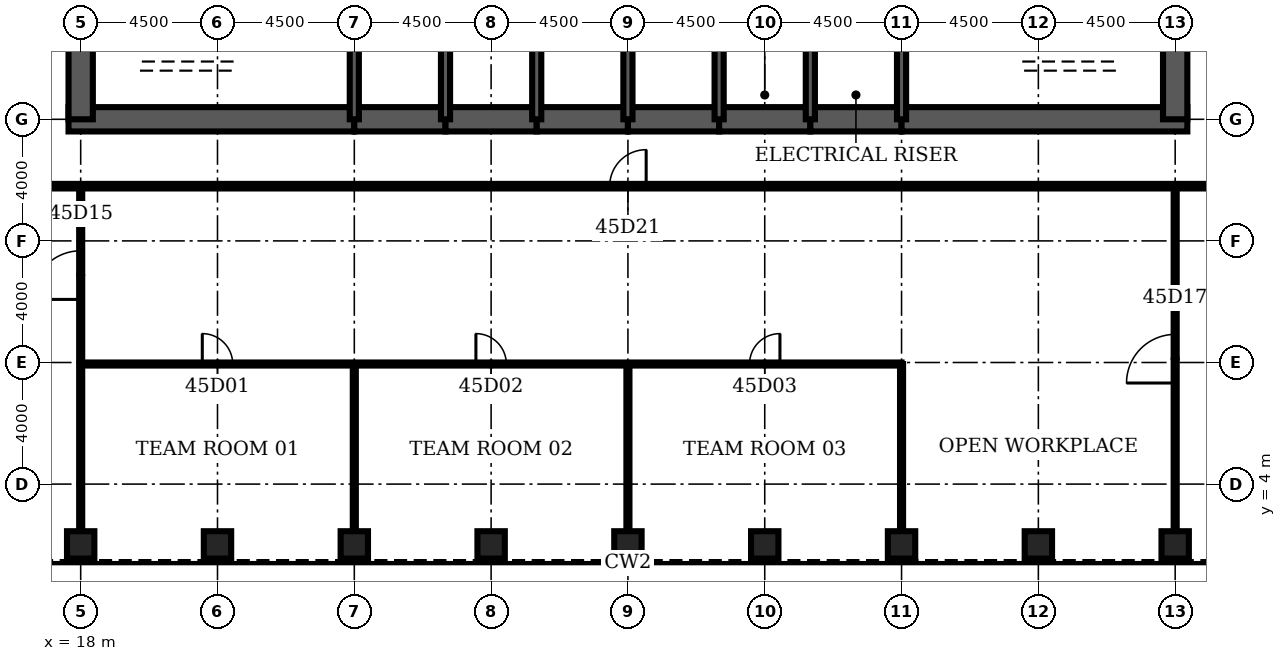
"""IFC4 building model, lengths in metres.
Left out: names, types, materials, properties, quantities, classifications, styles, units other than length and angle.
Written with IfcOpenShell. Run it as: python <this file> out.ifc"""

import sys

from ifc_helpers import new_model, si_unit, direction, frame, frame_2d, origin, origin_2d, place, context, subcontext, project, spatial, rectangle, hollow_rectangle, extrude, element, fill, save


model = new_model("IFC4")
c1 = context("Model", 3, precision=1e-05, world=origin(), true_north=direction((0.0, 1.0)))
c2 = subcontext(c1, "Body", "Model", "MODEL_VIEW")
j1 = project(units=[si_unit("LENGTHUNIT", "METRE"), si_unit("PLANEANGLEUNIT", "RADIAN")], contexts=[c1])
p1 = place(None, origin())
s1 = spatial("IfcSite", under=j1, at=p1, CompositionType="ELEMENT")
p2 = place(p1, origin())
s2 = spatial("IfcBuilding", under=s1, at=p2, CompositionType="ELEMENT")
p3 = place(p2, frame((0.0, 0.0, 202.6)))
s3 = spatial("IfcBuildingStorey", under=s2, at=p3, CompositionType="ELEMENT", Elevation=202.6)
for number, where, z_axis, x_axis in (
    (1, (18.0, 2.0, 0.0), (0.0, 0.0, 1.0), (0.0, 1.0, 0.0)),
    (2, (22.5, 2.0, 0.0), (0.0, 0.0, 1.0), (0.0, 1.0, 0.0)),
    (3, (27.0, 2.0, 0.0), (0.0, 0.0, 1.0), (0.0, 1.0, 0.0)),
    (4, (31.5, 2.0, 0.0), (0.0, 0.0, 1.0), (0.0, 1.0, 0.0)),
    (5, (36.0, 2.0, 0.0), (0.0, 0.0, 1.0), (0.0, 1.0, 0.0)),
    (6, (40.5, 2.0, 0.0), (0.0, 0.0, 1.0), (0.0, 1.0, 0.0)),
    (7, (45.0, 2.0, 0.0), (0.0, 0.0, 1.0), (0.0, 1.0, 0.0)),
    (8, (49.5, 2.0, 0.0), (0.0, 0.0, 1.0), (0.0, 1.0, 0.0)),
    (9, (54.0, 2.0, 0.0), (0.0, 0.0, 1.0), (0.0, 1.0, 0.0)),
):
    element("IfcColumn", number, at=place(p3, frame(where, z_axis=z_axis, x_axis=x_axis)), inside=s3, PredefinedType="COLUMN", context=c2, shape_type="SweptSolid", body=[
        extrude(hollow_rectangle(XDim=0.9, YDim=0.9, WallThickness=0.09, at=origin_2d()), origin(), (0.0, 0.0, 1.0), 4.2),
    ])
p4 = place(p3, frame((17.6, 16.0, 0.0), z_axis=(0.0, 0.0, 1.0), x_axis=(1.0, 0.0, 0.0)))
e10 = element("IfcWall", 10, at=p4, inside=s3, PredefinedType="SHEAR", context=c2, shape_type="SweptSolid", body=[
    extrude(rectangle(XDim=9.4, YDim=0.8, at=frame_2d((4.7, 0.0))), origin(), (0.0, 0.0, 1.0), 4.2),
])
for number, where, z_axis, x_axis in (
    (11, (27.0, 16.0, 0.0), (0.0, 0.0, 1.0), (1.0, 0.0, 0.0)),
    (12, (30.0, 16.0, 0.0), (0.0, 0.0, 1.0), (1.0, 0.0, 0.0)),
    (13, (33.0, 16.0, 0.0), (0.0, 0.0, 1.0), (1.0, 0.0, 0.0)),
    (14, (36.0, 16.0, 0.0), (0.0, 0.0, 1.0), (1.0, 0.0, 0.0)),
    (15, (39.0, 16.0, 0.0), (0.0, 0.0, 1.0), (1.0, 0.0, 0.0)),
    (16, (42.0, 16.0, 0.0), (0.0, 0.0, 1.0), (1.0, 0.0, 0.0)),
):
    element("IfcWall", number, at=place(p3, frame(where, z_axis=z_axis, x_axis=x_axis)), inside=s3, PredefinedType="SHEAR", context=c2, shape_type="SweptSolid", body=[
        extrude(rectangle(XDim=3.0, YDim=0.8, at=frame_2d((1.5, 0.0))), origin(), (0.0, 0.0, 1.0), 4.2),
    ])
p5 = place(p3, frame((45.0, 16.0, 0.0), z_axis=(0.0, 0.0, 1.0), x_axis=(1.0, 0.0, 0.0)))
e17 = element("IfcWall", 17, at=p5, inside=s3, PredefinedType="SHEAR", context=c2, shape_type="SweptSolid", body=[
    extrude(rectangle(XDim=9.4, YDim=0.8, at=frame_2d((4.7, 0.0))), origin(), (0.0, 0.0, 1.0), 4.2),
])
for number, where, z_axis, x_axis in (
    (18, (18.0, 19.2, 0.0), (0.0, 0.0, 1.0), (0.0, -1.0, 0.0)),
    (19, (54.0, 16.0, 0.0), (0.0, 0.0, 1.0), (0.0, 1.0, 0.0)),
):
    element("IfcWall", number, at=place(p3, frame(where, z_axis=z_axis, x_axis=x_axis)), inside=s3, PredefinedType="SHEAR", context=c2, shape_type="SweptSolid", body=[
        extrude(rectangle(XDim=3.2, YDim=0.8, at=frame_2d((1.6, 0.0))), origin(), (0.0, 0.0, 1.0), 4.2),
    ])
for number, where, z_axis, x_axis in (
    (20, (27.0, 16.0, 0.0), (0.0, 0.0, 1.0), (0.0, 1.0, 0.0)),
    (21, (30.0, 16.0, 0.0), (0.0, 0.0, 1.0), (0.0, 1.0, 0.0)),
    (22, (33.0, 16.0, 0.0), (0.0, 0.0, 1.0), (0.0, 1.0, 0.0)),
    (23, (36.0, 16.0, 0.0), (0.0, 0.0, 1.0), (0.0, 1.0, 0.0)),
    (24, (39.0, 16.0, 0.0), (0.0, 0.0, 1.0), (0.0, 1.0, 0.0)),
    (25, (42.0, 16.0, 0.0), (0.0, 0.0, 1.0), (0.0, 1.0, 0.0)),
    (26, (45.0, 16.0, 0.0), (0.0, 0.0, 1.0), (0.0, 1.0, 0.0)),
):
    element("IfcWall", number, at=place(p3, frame(where, z_axis=z_axis, x_axis=x_axis)), inside=s3, PredefinedType="SOLIDWALL", context=c2, shape_type="SweptSolid", body=[
        extrude(rectangle(XDim=3.2, YDim=0.3, at=frame_2d((1.6, 0.0))), origin(), (0.0, 0.0, 1.0), 4.2),
    ])
p6 = place(p3, frame((39.15, 17.35, 0.0), z_axis=(0.0, 0.0, 1.0), x_axis=(1.0, 0.0, 0.0)))
e27 = element("IfcWall", 27, at=p6, inside=s3, PredefinedType="SOLIDWALL", context=c2, shape_type="SweptSolid", body=[
    extrude(rectangle(XDim=2.7, YDim=0.3, at=frame_2d((1.35, 0.0))), origin(), (0.0, 0.0, 1.0), 4.04),
])
p7 = place(p6, frame((0.85, 0.0, 0.0)))
e28 = element("IfcOpeningElement", 28, at=p7, cuts=e27, PredefinedType="OPENING", context=c2, shape_type="SweptSolid", body=[
    extrude(rectangle(XDim=1.0, YDim=2.1, at=frame_2d((0.5, 1.05))), frame((0.0, 0.16, 0.0), z_axis=(0.0, -1.0, 0.0), x_axis=(1.0, 0.0, 0.0)), (0.0, 0.0, 1.0), 0.32),
])
p8 = place(p3, frame((42.15, 17.35, 0.0), z_axis=(0.0, 0.0, 1.0), x_axis=(1.0, 0.0, 0.0)))
e29 = element("IfcWall", 29, at=p8, inside=s3, PredefinedType="SOLIDWALL", context=c2, shape_type="SweptSolid", body=[
    extrude(rectangle(XDim=2.7, YDim=0.3, at=frame_2d((1.35, 0.0))), origin(), (0.0, 0.0, 1.0), 4.04),
])
p9 = place(p8, frame((0.85, 0.0, 0.0)))
e30 = element("IfcOpeningElement", 30, at=p9, cuts=e29, PredefinedType="OPENING", context=c2, shape_type="SweptSolid", body=[
    extrude(rectangle(XDim=1.0, YDim=2.1, at=frame_2d((0.5, 1.05))), frame((0.0, 0.16, 0.0), z_axis=(0.0, -1.0, 0.0), x_axis=(1.0, 0.0, 0.0)), (0.0, 0.0, 1.0), 0.32),
])
p10 = place(p3, frame((18.0, 7.95, 0.0), z_axis=(0.0, 0.0, 1.0), x_axis=(1.0, 0.0, 0.0)))
e31 = element("IfcWall", 31, at=p10, inside=s3, PredefinedType="PARTITIONING", context=c2, shape_type="SweptSolid", body=[
    extrude(rectangle(XDim=27.0, YDim=0.1, at=frame_2d((13.5, 0.0))), origin(), (0.0, 0.0, 1.0), 3.0),
])
p11 = place(p10, frame((4.0, 0.0, 0.0)))
e32 = element("IfcOpeningElement", 32, at=p11, cuts=e31, PredefinedType="OPENING", context=c2, shape_type="SweptSolid", body=[
    extrude(rectangle(XDim=1.0, YDim=2.1, at=frame_2d((0.5, 1.05))), frame((0.0, 0.06, 0.0), z_axis=(0.0, -1.0, 0.0), x_axis=(1.0, 0.0, 0.0)), (0.0, 0.0, 1.0), 0.12),
])
p12 = place(p10, frame((13.0, 0.0, 0.0)))
e33 = element("IfcOpeningElement", 33, at=p12, cuts=e31, PredefinedType="OPENING", context=c2, shape_type="SweptSolid", body=[
    extrude(rectangle(XDim=1.0, YDim=2.1, at=frame_2d((0.5, 1.05))), frame((0.0, 0.06, 0.0), z_axis=(0.0, -1.0, 0.0), x_axis=(1.0, 0.0, 0.0)), (0.0, 0.0, 1.0), 0.12),
])
p13 = place(p10, frame((22.0, 0.0, 0.0)))
e34 = element("IfcOpeningElement", 34, at=p13, cuts=e31, PredefinedType="OPENING", context=c2, shape_type="SweptSolid", body=[
    extrude(rectangle(XDim=1.0, YDim=2.1, at=frame_2d((0.5, 1.05))), frame((0.0, 0.06, 0.0), z_axis=(0.0, -1.0, 0.0), x_axis=(1.0, 0.0, 0.0)), (0.0, 0.0, 1.0), 0.12),
])
p14 = place(p3, frame((15.2, 13.8, 0.0), z_axis=(0.0, 0.0, 1.0), x_axis=(1.0, 0.0, 0.0)))
e35 = element("IfcWall", 35, at=p14, inside=s3, PredefinedType="PARTITIONING", context=c2, shape_type="SweptSolid", body=[
    extrude(rectangle(XDim=41.6, YDim=0.15, at=frame_2d((20.8, 0.0))), origin(), (0.0, 0.0, 1.0), 3.0),
])
p15 = place(p14, frame((20.2, 0.0, 0.0)))
e36 = element("IfcOpeningElement", 36, at=p15, cuts=e35, PredefinedType="OPENING", context=c2, shape_type="SweptSolid", body=[
    extrude(rectangle(XDim=1.2, YDim=2.1, at=frame_2d((0.6, 1.05))), frame((0.0, 0.085, 0.0), z_axis=(0.0, -1.0, 0.0), x_axis=(1.0, 0.0, 0.0)), (0.0, 0.0, 1.0), 0.17),
])
p16 = place(p3, frame((18.0, 2.45, 0.0), z_axis=(0.0, 0.0, 1.0), x_axis=(0.0, 1.0, 0.0)))
e37 = element("IfcWall", 37, at=p16, inside=s3, PredefinedType="PARTITIONING", context=c2, shape_type="SweptSolid", body=[
    extrude(rectangle(XDim=11.35, YDim=0.1, at=frame_2d((5.675, 0.0))), origin(), (0.0, 0.0, 1.0), 3.0),
])
p17 = place(p16, frame((7.625, 0.0, 0.0)))
e38 = element("IfcOpeningElement", 38, at=p17, cuts=e37, PredefinedType="OPENING", context=c2, shape_type="SweptSolid", body=[
    extrude(rectangle(XDim=1.6, YDim=2.1, at=frame_2d((0.8, 1.05))), frame((0.0, 0.06, 0.0), z_axis=(0.0, -1.0, 0.0), x_axis=(1.0, 0.0, 0.0)), (0.0, 0.0, 1.0), 0.12),
])
for number, where, z_axis, x_axis in (
    (39, (27.0, 2.45, 0.0), (0.0, 0.0, 1.0), (0.0, 1.0, 0.0)),
    (40, (36.0, 2.45, 0.0), (0.0, 0.0, 1.0), (0.0, 1.0, 0.0)),
    (41, (45.0, 2.45, 0.0), (0.0, 0.0, 1.0), (0.0, 1.0, 0.0)),
):
    element("IfcWall", number, at=place(p3, frame(where, z_axis=z_axis, x_axis=x_axis)), inside=s3, PredefinedType="PARTITIONING", context=c2, shape_type="SweptSolid", body=[
        extrude(rectangle(XDim=5.5, YDim=0.1, at=frame_2d((2.75, 0.0))), origin(), (0.0, 0.0, 1.0), 3.0),
    ])
p18 = place(p3, frame((54.0, 2.45, 0.0), z_axis=(0.0, 0.0, 1.0), x_axis=(0.0, 1.0, 0.0)))
e42 = element("IfcWall", 42, at=p18, inside=s3, PredefinedType="PARTITIONING", context=c2, shape_type="SweptSolid", body=[
    extrude(rectangle(XDim=11.35, YDim=0.1, at=frame_2d((5.675, 0.0))), origin(), (0.0, 0.0, 1.0), 3.0),
])
p19 = place(p18, frame((4.875, 0.0, 0.0)))
e43 = element("IfcOpeningElement", 43, at=p19, cuts=e42, PredefinedType="OPENING", context=c2, shape_type="SweptSolid", body=[
    extrude(rectangle(XDim=1.6, YDim=2.1, at=frame_2d((0.8, 1.05))), frame((0.0, 0.06, 0.0), z_axis=(0.0, -1.0, 0.0), x_axis=(1.0, 0.0, 0.0)), (0.0, 0.0, 1.0), 0.12),
])
p20 = place(p7, origin())
e44 = element("IfcDoor", 44, at=p20, inside=s3, OperationType="SINGLE_SWING_LEFT", PredefinedType="DOOR", context=c2, shape_type="SweptSolid", body=[
    extrude(rectangle(XDim=1.0, YDim=2.1, at=frame_2d((0.5, 1.05))), frame((0.0, 0.025, 0.0), z_axis=(0.0, -1.0, 0.0), x_axis=(1.0, 0.0, 0.0)), (0.0, 0.0, 1.0), 0.05),
])
fill(e28, e44)
p21 = place(p9, origin())
e45 = element("IfcDoor", 45, at=p21, inside=s3, OperationType="SINGLE_SWING_LEFT", PredefinedType="DOOR", context=c2, shape_type="SweptSolid", body=[
    extrude(rectangle(XDim=1.0, YDim=2.1, at=frame_2d((0.5, 1.05))), frame((0.0, 0.025, 0.0), z_axis=(0.0, -1.0, 0.0), x_axis=(1.0, 0.0, 0.0)), (0.0, 0.0, 1.0), 0.05),
])
fill(e30, e45)
p22 = place(p11, origin())
e46 = element("IfcDoor", 46, at=p22, inside=s3, OperationType="SINGLE_SWING_LEFT", PredefinedType="DOOR", context=c2, shape_type="SweptSolid", body=[
    extrude(rectangle(XDim=1.0, YDim=2.1, at=frame_2d((0.5, 1.05))), frame((0.0, 0.025, 0.0), z_axis=(0.0, -1.0, 0.0), x_axis=(1.0, 0.0, 0.0)), (0.0, 0.0, 1.0), 0.05),
])
fill(e32, e46)
p23 = place(p12, origin())
e47 = element("IfcDoor", 47, at=p23, inside=s3, OperationType="SINGLE_SWING_LEFT", PredefinedType="DOOR", context=c2, shape_type="SweptSolid", body=[
    extrude(rectangle(XDim=1.0, YDim=2.1, at=frame_2d((0.5, 1.05))), frame((0.0, 0.025, 0.0), z_axis=(0.0, -1.0, 0.0), x_axis=(1.0, 0.0, 0.0)), (0.0, 0.0, 1.0), 0.05),
])
fill(e33, e47)
p24 = place(p13, origin())
e48 = element("IfcDoor", 48, at=p24, inside=s3, OperationType="SINGLE_SWING_RIGHT", PredefinedType="DOOR", context=c2, shape_type="SweptSolid", body=[
    extrude(rectangle(XDim=1.0, YDim=2.1, at=frame_2d((0.5, 1.05))), frame((0.0, 0.025, 0.0), z_axis=(0.0, -1.0, 0.0), x_axis=(1.0, 0.0, 0.0)), (0.0, 0.0, 1.0), 0.05),
])
fill(e34, e48)
p25 = place(p17, origin())
e49 = element("IfcDoor", 49, at=p25, inside=s3, OperationType="SINGLE_SWING_LEFT", PredefinedType="DOOR", context=c2, shape_type="SweptSolid", body=[
    extrude(rectangle(XDim=1.6, YDim=2.1, at=frame_2d((0.8, 1.05))), frame((0.0, 0.025, 0.0), z_axis=(0.0, -1.0, 0.0), x_axis=(1.0, 0.0, 0.0)), (0.0, 0.0, 1.0), 0.05),
])
fill(e38, e49)
p26 = place(p19, origin())
e50 = element("IfcDoor", 50, at=p26, inside=s3, OperationType="SINGLE_SWING_LEFT", PredefinedType="DOOR", context=c2, shape_type="SweptSolid", body=[
    extrude(rectangle(XDim=1.6, YDim=2.1, at=frame_2d((0.8, 1.05))), frame((0.0, 0.025, 0.0), z_axis=(0.0, -1.0, 0.0), x_axis=(1.0, 0.0, 0.0)), (0.0, 0.0, 1.0), 0.05),
])
fill(e43, e50)
p27 = place(p15, origin())
e51 = element("IfcDoor", 51, at=p27, inside=s3, OperationType="SINGLE_SWING_RIGHT", PredefinedType="DOOR", context=c2, shape_type="SweptSolid", body=[
    extrude(rectangle(XDim=1.2, YDim=2.1, at=frame_2d((0.6, 1.05))), frame((0.0, 0.025, 0.0), z_axis=(0.0, -1.0, 0.0), x_axis=(1.0, 0.0, 0.0)), (0.0, 0.0, 1.0), 0.05),
])
fill(e36, e51)
save(model, sys.argv[1])
